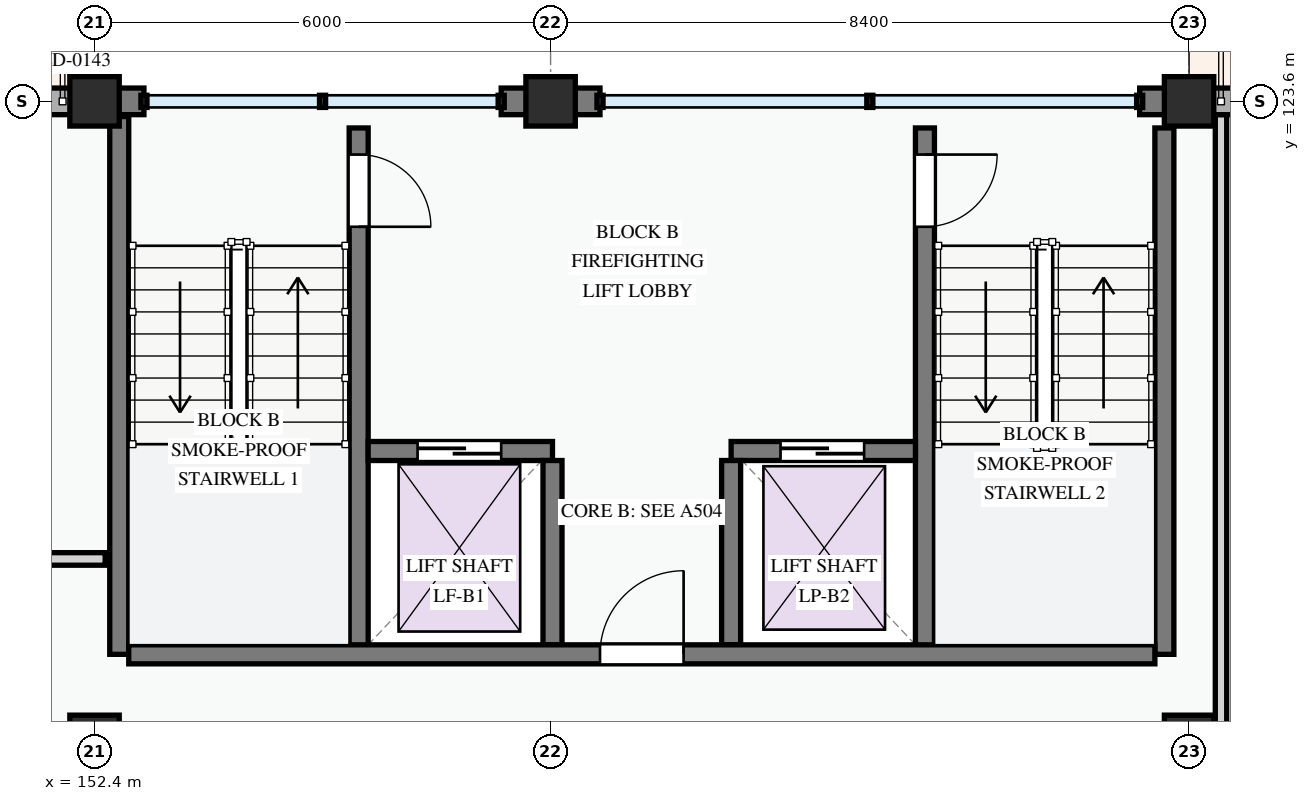
"""IFC4 building model, lengths in metres.
Left out: names, types, materials, properties, quantities, classifications, styles, units other than length and angle.
Written with IfcOpenShell. Run it as: python <this file> out.ifc"""

import sys

from ifc_helpers import new_model, si_unit, direction, frame, frame_2d, origin, origin_2d, place, context, subcontext, project, spatial, rectangle, extrude, element, fill, save


model = new_model("IFC4")
c1 = context("Model", 3, precision=1e-05, world=origin(), true_north=direction((0.0, 1.0)))
c2 = subcontext(c1, "Body", "Model", "MODEL_VIEW")
j1 = project(units=[si_unit("LENGTHUNIT", "METRE"), si_unit("PLANEANGLEUNIT", "RADIAN")], contexts=[c1])
p1 = place(None, origin())
s1 = spatial("IfcSite", under=j1, at=p1, CompositionType="ELEMENT")
p2 = place(p1, origin())
s2 = spatial("IfcBuilding", under=s1, at=p2, CompositionType="ELEMENT")
p3 = place(p2, frame((0.0, 0.0, 11.4)))
s3 = spatial("IfcBuildingStorey", under=s2, at=p3, CompositionType="ELEMENT", Elevation=11.4)
for number, where, z_axis, x_axis in (
    (1, (152.4, 115.2, 0.0), (0.0, 0.0, 1.0), (1.0, 0.0, 0.0)),
    (2, (152.4, 123.6, 0.0), (0.0, 0.0, 1.0), (1.0, 0.0, 0.0)),
    (3, (158.4, 123.6, 0.0), (0.0, 0.0, 1.0), (1.0, 0.0, 0.0)),
    (4, (166.8, 115.2, 0.0), (0.0, 0.0, 1.0), (1.0, 0.0, 0.0)),
    (5, (166.8, 123.6, 0.0), (0.0, 0.0, 1.0), (1.0, 0.0, 0.0)),
):
    element("IfcColumn", number, at=place(p3, frame(where, z_axis=z_axis, x_axis=x_axis)), inside=s3, PredefinedType="COLUMN", context=c2, shape_type="SweptSolid", body=[
        extrude(rectangle(XDim=0.65, YDim=0.65, at=origin_2d()), origin(), (0.0, 0.0, 1.0), 3.3),
    ])
p4 = place(p3, frame((174.0, 123.6, 0.0), z_axis=(0.0, 0.0, 1.0), x_axis=(-1.0, 0.0, 0.0)))
e6 = element("IfcWall", 6, at=p4, inside=s3, PredefinedType="STANDARD", context=c2, shape_type="SweptSolid", body=[
    extrude(rectangle(XDim=7.2, YDim=0.35, at=frame_2d((3.6, 0.0))), origin(), (0.0, 0.0, 1.0), 2.375),
])
p5 = place(p4, frame((0.62, 0.0, 0.0)))
e7 = element("IfcOpeningElement", 7, at=p5, cuts=e6, PredefinedType="OPENING", context=c2, shape_type="SweptSolid", body=[
    extrude(rectangle(XDim=1.1, YDim=2.15, at=frame_2d((0.55, 1.075))), frame((0.0, 0.185, 0.0), z_axis=(0.0, -1.0, 0.0), x_axis=(1.0, 0.0, 0.0)), (0.0, 0.0, 1.0), 0.37),
])
p6 = place(p4, frame((2.532, 0.0, 0.78)))
e8 = element("IfcOpeningElement", 8, at=p6, cuts=e6, PredefinedType="OPENING", context=c2, shape_type="SweptSolid", body=[
    extrude(rectangle(XDim=1.05, YDim=1.2, at=frame_2d((0.525, 0.6))), frame((0.0, 0.185, 0.0), z_axis=(0.0, -1.0, 0.0), x_axis=(1.0, 0.0, 0.0)), (0.0, 0.0, 1.0), 0.37),
])
p7 = place(p4, frame((4.732, 0.0, 0.78)))
e9 = element("IfcOpeningElement", 9, at=p7, cuts=e6, PredefinedType="OPENING", context=c2, shape_type="SweptSolid", body=[
    extrude(rectangle(XDim=1.52, YDim=1.42, at=frame_2d((0.76, 0.71))), frame((0.0, 0.185, 0.0), z_axis=(0.0, -1.0, 0.0), x_axis=(1.0, 0.0, 0.0)), (0.0, 0.0, 1.0), 0.37),
])
for number, where, z_axis, x_axis in (
    (10, (166.8, 123.6, 0.0), (0.0, 0.0, 1.0), (-1.0, 0.0, 0.0)),
    (11, (159.05, 123.6, 0.0), (0.0, 0.0, 1.0), (-1.0, 0.0, 0.0)),
):
    element("IfcWall", number, at=place(p3, frame(where, z_axis=z_axis, x_axis=x_axis)), inside=s3, PredefinedType="STANDARD", context=c2, shape_type="SweptSolid", body=[
        extrude(rectangle(XDim=0.65, YDim=0.35, at=frame_2d((0.325, 0.0))), origin(), (0.0, 0.0, 1.0), 3.04),
    ])
p8 = place(p3, frame((158.4, 123.6, 0.0), z_axis=(0.0, 0.0, 1.0), x_axis=(-1.0, 0.0, 0.0)))
e12 = element("IfcWall", 12, at=p8, inside=s3, PredefinedType="STANDARD", context=c2, shape_type="SweptSolid", body=[
    extrude(rectangle(XDim=0.65, YDim=0.35, at=frame_2d((0.325, 0.0))), origin(), (0.0, 0.0, 1.0), 3.04),
])
p9 = place(p3, frame((153.05, 123.6, 0.0), z_axis=(0.0, 0.0, 1.0), x_axis=(-1.0, 0.0, 0.0)))
e13 = element("IfcWall", 13, at=p9, inside=s3, PredefinedType="STANDARD", context=c2, shape_type="SweptSolid", body=[
    extrude(rectangle(XDim=0.65, YDim=0.35, at=frame_2d((0.325, 0.0))), origin(), (0.0, 0.0, 1.0), 3.04),
])
p10 = place(p3, frame((152.4, 123.6, 0.0), z_axis=(0.0, 0.0, 1.0), x_axis=(-1.0, 0.0, 0.0)))
e14 = element("IfcWall", 14, at=p10, inside=s3, PredefinedType="STANDARD", context=c2, shape_type="SweptSolid", body=[
    extrude(rectangle(XDim=8.4, YDim=0.35, at=frame_2d((4.2, 0.0))), origin(), (0.0, 0.0, 1.0), 2.375),
])
p11 = place(p10, frame((0.62, 0.0, 0.0)))
e15 = element("IfcOpeningElement", 15, at=p11, cuts=e14, PredefinedType="OPENING", context=c2, shape_type="SweptSolid", body=[
    extrude(rectangle(XDim=1.3, YDim=2.15, at=frame_2d((0.65, 1.075))), frame((0.0, 0.185, 0.0), z_axis=(0.0, -1.0, 0.0), x_axis=(1.0, 0.0, 0.0)), (0.0, 0.0, 1.0), 0.37),
])
p12 = place(p10, frame((2.855, 0.0, 0.78)))
e16 = element("IfcOpeningElement", 16, at=p12, cuts=e14, PredefinedType="OPENING", context=c2, shape_type="SweptSolid", body=[
    extrude(rectangle(XDim=1.42, YDim=1.38, at=frame_2d((0.71, 0.69))), frame((0.0, 0.185, 0.0), z_axis=(0.0, -1.0, 0.0), x_axis=(1.0, 0.0, 0.0)), (0.0, 0.0, 1.0), 0.37),
])
p13 = place(p10, frame((5.655, 0.0, 0.78)))
e17 = element("IfcOpeningElement", 17, at=p13, cuts=e14, PredefinedType="OPENING", context=c2, shape_type="SweptSolid", body=[
    extrude(rectangle(XDim=1.92, YDim=1.44, at=frame_2d((0.96, 0.72))), frame((0.0, 0.185, 0.0), z_axis=(0.0, -1.0, 0.0), x_axis=(1.0, 0.0, 0.0)), (0.0, 0.0, 1.0), 0.37),
])
p14 = place(p3, frame((155.875, 123.25, 0.0), z_axis=(0.0, 0.0, 1.0), x_axis=(0.0, -1.0, 0.0)))
e18 = element("IfcWall", 18, at=p14, inside=s3, PredefinedType="SHEAR", context=c2, shape_type="SweptSolid", body=[
    extrude(rectangle(XDim=6.925, YDim=0.25, at=frame_2d((3.462, 0.0))), origin(), (0.0, 0.0, 1.0), 3.0),
])
p15 = place(p14, frame((0.35, 0.0, 0.0)))
e19 = element("IfcOpeningElement", 19, at=p15, cuts=e18, PredefinedType="OPENING", context=c2, shape_type="SweptSolid", body=[
    extrude(rectangle(XDim=0.95, YDim=2.1, at=frame_2d((0.475, 1.05))), frame((0.0, 0.135, 0.0), z_axis=(0.0, -1.0, 0.0), x_axis=(1.0, 0.0, 0.0)), (0.0, 0.0, 1.0), 0.27),
])
p16 = place(p3, frame((152.725, 123.4, 0.0), z_axis=(0.0, 0.0, 1.0), x_axis=(0.0, -1.0, 0.0)))
e20 = element("IfcWall", 20, at=p16, inside=s3, PredefinedType="SHEAR", context=c2, shape_type="SweptSolid", body=[
    extrude(rectangle(XDim=7.075, YDim=0.25, at=frame_2d((3.538, 0.0))), origin(), (0.0, 0.0, 1.0), 3.0),
])
p17 = place(p3, frame((166.475, 123.25, 0.0), z_axis=(0.0, 0.0, 1.0), x_axis=(0.0, -1.0, 0.0)))
e21 = element("IfcWall", 21, at=p17, inside=s3, PredefinedType="SHEAR", context=c2, shape_type="SweptSolid", body=[
    extrude(rectangle(XDim=6.925, YDim=0.25, at=frame_2d((3.462, 0.0))), origin(), (0.0, 0.0, 1.0), 3.0),
])
p18 = place(p3, frame((163.325, 123.25, 0.0), z_axis=(0.0, 0.0, 1.0), x_axis=(0.0, -1.0, 0.0)))
e22 = element("IfcWall", 22, at=p18, inside=s3, PredefinedType="SHEAR", context=c2, shape_type="SweptSolid", body=[
    extrude(rectangle(XDim=6.925, YDim=0.25, at=frame_2d((3.462, 0.0))), origin(), (0.0, 0.0, 1.0), 3.0),
])
p19 = place(p18, frame((0.35, 0.0, 0.0)))
e23 = element("IfcOpeningElement", 23, at=p19, cuts=e22, PredefinedType="OPENING", context=c2, shape_type="SweptSolid", body=[
    extrude(rectangle(XDim=0.95, YDim=2.1, at=frame_2d((0.475, 1.05))), frame((0.0, 0.135, 0.0), z_axis=(0.0, -1.0, 0.0), x_axis=(1.0, 0.0, 0.0)), (0.0, 0.0, 1.0), 0.27),
])
p20 = place(p3, frame((156.0, 119.0, 0.0), z_axis=(0.0, 0.0, 1.0), x_axis=(1.0, 0.0, 0.0)))
e24 = element("IfcWall", 24, at=p20, inside=s3, PredefinedType="SHEAR", context=c2, shape_type="SweptSolid", body=[
    extrude(rectangle(XDim=2.425, YDim=0.25, at=frame_2d((1.212, 0.0))), origin(), (0.0, 0.0, 1.0), 3.0),
])
p21 = place(p20, frame((0.65, 0.0, 0.0)))
e25 = element("IfcOpeningElement", 25, at=p21, cuts=e24, PredefinedType="OPENING", context=c2, shape_type="SweptSolid", body=[
    extrude(rectangle(XDim=1.1, YDim=2.15, at=frame_2d((0.55, 1.075))), frame((0.0, 0.135, 0.0), z_axis=(0.0, -1.0, 0.0), x_axis=(1.0, 0.0, 0.0)), (0.0, 0.0, 1.0), 0.27),
])
p22 = place(p3, frame((160.775, 119.0, 0.0), z_axis=(0.0, 0.0, 1.0), x_axis=(1.0, 0.0, 0.0)))
e26 = element("IfcWall", 26, at=p22, inside=s3, PredefinedType="SHEAR", context=c2, shape_type="SweptSolid", body=[
    extrude(rectangle(XDim=2.425, YDim=0.25, at=frame_2d((1.212, 0.0))), origin(), (0.0, 0.0, 1.0), 3.0),
])
p23 = place(p22, frame((0.65, 0.0, 0.0)))
e27 = element("IfcOpeningElement", 27, at=p23, cuts=e26, PredefinedType="OPENING", context=c2, shape_type="SweptSolid", body=[
    extrude(rectangle(XDim=1.1, YDim=2.15, at=frame_2d((0.55, 1.075))), frame((0.0, 0.135, 0.0), z_axis=(0.0, -1.0, 0.0), x_axis=(1.0, 0.0, 0.0)), (0.0, 0.0, 1.0), 0.27),
])
for number, where, z_axis, x_axis in (
    (28, (158.425, 118.875, 0.0), (0.0, 0.0, 1.0), (0.0, -1.0, 0.0)),
    (29, (160.775, 118.875, 0.0), (0.0, 0.0, 1.0), (0.0, -1.0, 0.0)),
):
    element("IfcWall", number, at=place(p3, frame(where, z_axis=z_axis, x_axis=x_axis)), inside=s3, PredefinedType="SHEAR", context=c2, shape_type="SweptSolid", body=[
        extrude(rectangle(XDim=2.425, YDim=0.25, at=frame_2d((1.212, 0.0))), origin(), (0.0, 0.0, 1.0), 3.0),
    ])
p24 = place(p3, frame((152.85, 116.325, 0.0), z_axis=(0.0, 0.0, 1.0), x_axis=(1.0, 0.0, 0.0)))
e30 = element("IfcWall", 30, at=p24, inside=s3, PredefinedType="SHEAR", context=c2, shape_type="SweptSolid", body=[
    extrude(rectangle(XDim=13.5, YDim=0.25, at=frame_2d((6.75, 0.0))), origin(), (0.0, 0.0, 1.0), 3.0),
])
p25 = place(p24, frame((6.2, 0.0, 0.0)))
e31 = element("IfcOpeningElement", 31, at=p25, cuts=e30, PredefinedType="OPENING", context=c2, shape_type="SweptSolid", body=[
    extrude(rectangle(XDim=1.1, YDim=2.15, at=frame_2d((0.55, 1.075))), frame((0.0, 0.135, 0.0), z_axis=(0.0, -1.0, 0.0), x_axis=(1.0, 0.0, 0.0)), (0.0, 0.0, 1.0), 0.27),
])
p26 = place(p3, frame((80.577, 117.58, 0.0), z_axis=(0.0, 0.0, 1.0), x_axis=(1.0, 0.0, 0.0)))
e32 = element("IfcWall", 32, at=p26, inside=s3, PredefinedType="PARTITIONING", context=c2, shape_type="SweptSolid", body=[
    extrude(rectangle(XDim=71.963, YDim=0.165, at=frame_2d((35.981, 0.0))), origin(), (0.0, 0.0, 1.0), 3.0),
])
p27 = place(p26, frame((9.411, 0.0, 0.0)))
e33 = element("IfcOpeningElement", 33, at=p27, cuts=e32, PredefinedType="OPENING", context=c2, shape_type="SweptSolid", body=[
    extrude(rectangle(XDim=0.96, YDim=2.12, at=frame_2d((0.48, 1.06))), frame((0.0, 0.093, 0.0), z_axis=(0.0, -1.0, 0.0), x_axis=(1.0, 0.0, 0.0)), (0.0, 0.0, 1.0), 0.185),
])
p28 = place(p26, frame((23.793, 0.0, 0.0)))
e34 = element("IfcOpeningElement", 34, at=p28, cuts=e32, PredefinedType="OPENING", context=c2, shape_type="SweptSolid", body=[
    extrude(rectangle(XDim=0.92, YDim=2.1, at=frame_2d((0.46, 1.05))), frame((0.0, 0.093, 0.0), z_axis=(0.0, -1.0, 0.0), x_axis=(1.0, 0.0, 0.0)), (0.0, 0.0, 1.0), 0.185),
])
p29 = place(p26, frame((52.718, 0.0, 0.0)))
e35 = element("IfcOpeningElement", 35, at=p29, cuts=e32, PredefinedType="OPENING", context=c2, shape_type="SweptSolid", body=[
    extrude(rectangle(XDim=0.92, YDim=2.1, at=frame_2d((0.46, 1.05))), frame((0.0, 0.093, 0.0), z_axis=(0.0, -1.0, 0.0), x_axis=(1.0, 0.0, 0.0)), (0.0, 0.0, 1.0), 0.185),
])
p30 = place(p3, frame((167.22, 109.435, 0.0), z_axis=(0.0, 0.0, 1.0), x_axis=(0.0, 1.0, 0.0)))
e36 = element("IfcWall", 36, at=p30, inside=s3, PredefinedType="PARTITIONING", context=c2, shape_type="SweptSolid", body=[
    extrude(rectangle(XDim=13.989, YDim=0.15, at=frame_2d((6.994, 0.0))), origin(), (0.0, 0.0, 1.0), 2.425),
])
p31 = place(p30, frame((2.456, 0.0, 0.0)))
e37 = element("IfcOpeningElement", 37, at=p31, cuts=e36, PredefinedType="OPENING", context=c2, shape_type="SweptSolid", body=[
    extrude(rectangle(XDim=0.92, YDim=2.1, at=frame_2d((0.46, 1.05))), frame((0.0, 0.085, 0.0), z_axis=(0.0, -1.0, 0.0), x_axis=(1.0, 0.0, 0.0)), (0.0, 0.0, 1.0), 0.17),
])
p32 = place(p15, origin())
e38 = element("IfcDoor", 38, at=p32, inside=s3, OperationType="SINGLE_SWING_RIGHT", PredefinedType="DOOR", context=c2, shape_type="SweptSolid", body=[
    extrude(rectangle(XDim=0.95, YDim=2.1, at=frame_2d((0.475, 1.05))), frame((0.0, 0.025, 0.0), z_axis=(0.0, -1.0, 0.0), x_axis=(1.0, 0.0, 0.0)), (0.0, 0.0, 1.0), 0.05),
])
fill(e19, e38)
p33 = place(p19, origin())
e39 = element("IfcDoor", 39, at=p33, inside=s3, OperationType="SINGLE_SWING_LEFT", PredefinedType="DOOR", context=c2, shape_type="SweptSolid", body=[
    extrude(rectangle(XDim=0.95, YDim=2.1, at=frame_2d((0.475, 1.05))), frame((0.0, 0.025, 0.0), z_axis=(0.0, -1.0, 0.0), x_axis=(1.0, 0.0, 0.0)), (0.0, 0.0, 1.0), 0.05),
])
fill(e23, e39)
p34 = place(p21, origin())
e40 = element("IfcDoor", 40, at=p34, inside=s3, OperationType="SLIDING_TO_LEFT", PredefinedType="DOOR", context=c2, shape_type="SweptSolid", body=[
    extrude(rectangle(XDim=1.1, YDim=2.15, at=frame_2d((0.55, 1.075))), frame((0.0, 0.025, 0.0), z_axis=(0.0, -1.0, 0.0), x_axis=(1.0, 0.0, 0.0)), (0.0, 0.0, 1.0), 0.05),
])
fill(e25, e40)
p35 = place(p23, origin())
e41 = element("IfcDoor", 41, at=p35, inside=s3, OperationType="SLIDING_TO_LEFT", PredefinedType="DOOR", context=c2, shape_type="SweptSolid", body=[
    extrude(rectangle(XDim=1.1, YDim=2.15, at=frame_2d((0.55, 1.075))), frame((0.0, 0.025, 0.0), z_axis=(0.0, -1.0, 0.0), x_axis=(1.0, 0.0, 0.0)), (0.0, 0.0, 1.0), 0.05),
])
fill(e27, e41)
p36 = place(p25, origin())
e42 = element("IfcDoor", 42, at=p36, inside=s3, OperationType="SINGLE_SWING_RIGHT", PredefinedType="DOOR", context=c2, shape_type="SweptSolid", body=[
    extrude(rectangle(XDim=1.1, YDim=2.15, at=frame_2d((0.55, 1.075))), frame((0.0, 0.025, 0.0), z_axis=(0.0, -1.0, 0.0), x_axis=(1.0, 0.0, 0.0)), (0.0, 0.0, 1.0), 0.05),
])
fill(e31, e42)
save(model, sys.argv[1])
